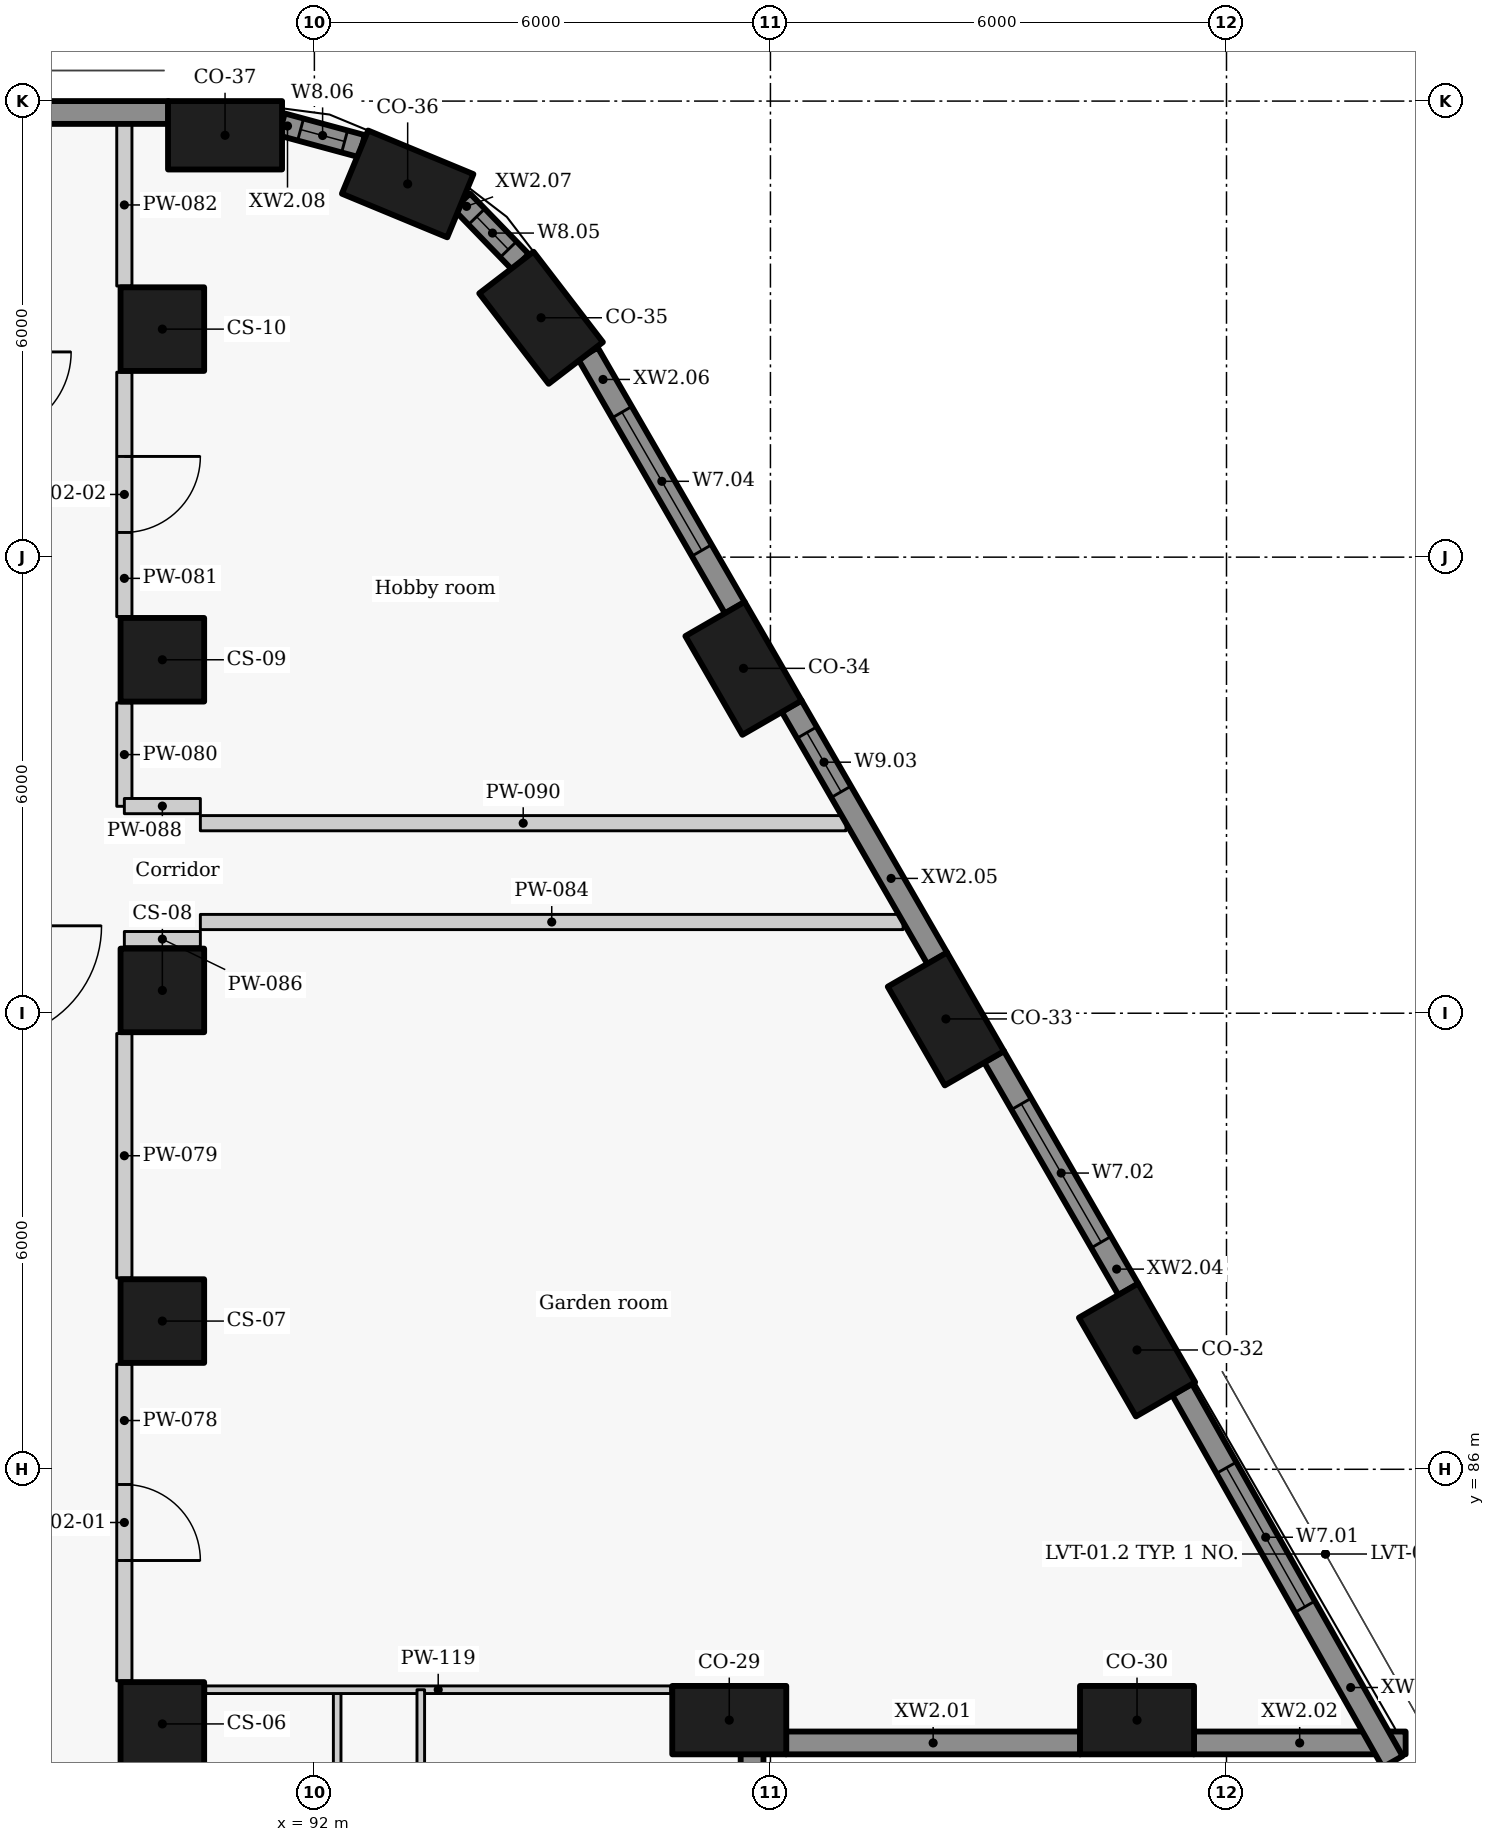
"""IFC4 building model, lengths in metres.
Left out: names, types, materials, properties, quantities, classifications, styles, units other than length and angle.
Written with IfcOpenShell. Run it as: python <this file> out.ifc"""

import sys

from ifc_helpers import new_model, si_unit, direction, frame, frame_2d, origin, origin_2d, place, context, subcontext, project, spatial, rectangle, extrude, element, fill, save


model = new_model("IFC4")
c1 = context("Model", 3, precision=1e-05, world=origin(), true_north=direction((0.0, 1.0)))
c2 = subcontext(c1, "Body", "Model", "MODEL_VIEW")
j1 = project(units=[si_unit("LENGTHUNIT", "METRE"), si_unit("PLANEANGLEUNIT", "RADIAN")], contexts=[c1])
p1 = place(None, origin())
s1 = spatial("IfcSite", under=j1, at=p1, CompositionType="ELEMENT")
p2 = place(p1, origin())
s2 = spatial("IfcBuilding", under=s1, at=p2, CompositionType="ELEMENT")
p3 = place(p2, frame((0.0, 0.0, 51.3)))
s3 = spatial("IfcBuildingStorey", under=s2, at=p3, CompositionType="ELEMENT", Elevation=51.3)
for number, where, z_axis, x_axis in (
    (1, (97.458, 82.7, 0.0), (0.0, 0.0, 1.0), (1.0, 0.0, 0.0)),
    (2, (102.823, 82.7, 0.0), (0.0, 0.0, 1.0), (1.0, 0.0, 0.0)),
    (3, (102.823, 87.57, 0.0), (0.0, 0.0, 1.0), (-0.5, 0.866, 0.0)),
    (4, (100.308, 91.925, 0.0), (0.0, 0.0, 1.0), (-0.5, 0.866, 0.0)),
    (5, (97.646, 96.537, 0.0), (0.0, 0.0, 1.0), (-0.5, 0.866, 0.0)),
    (6, (94.982, 101.149, 0.0), (0.0, 0.0, 1.0), (-0.609, 0.793, 0.0)),
    (7, (93.227, 102.91, 0.0), (0.0, 0.0, 1.0), (-0.924, 0.383, 0.0)),
    (8, (90.825, 103.55, 0.0), (0.0, 0.0, 1.0), (-1.0, 0.0, 0.0)),
):
    element("IfcColumn", number, at=place(p3, frame(where, z_axis=z_axis, x_axis=x_axis)), inside=s3, PredefinedType="COLUMN", context=c2, shape_type="SweptSolid", body=[
        extrude(rectangle(XDim=1.5, YDim=0.9, at=origin_2d()), origin(), (0.0, 0.0, 1.0), 3.3),
    ])
for number, where, z_axis, x_axis in (
    (9, (90.0, 82.65, 0.0), (0.0, 0.0, 1.0), (0.0, 1.0, 0.0)),
    (10, (90.0, 87.95, 0.0), (0.0, 0.0, 1.0), (0.0, 1.0, 0.0)),
    (11, (90.0, 92.3, 0.0), (0.0, 0.0, 1.0), (0.0, 1.0, 0.0)),
    (12, (90.0, 96.65, 0.0), (0.0, 0.0, 1.0), (0.0, 1.0, 0.0)),
    (13, (90.0, 101.0, 0.0), (0.0, 0.0, 1.0), (0.0, 1.0, 0.0)),
):
    element("IfcColumn", number, at=place(p3, frame(where, z_axis=z_axis, x_axis=x_axis)), inside=s3, PredefinedType="COLUMN", context=c2, shape_type="SweptSolid", body=[
        extrude(rectangle(XDim=1.1, YDim=1.1, at=origin_2d()), origin(), (0.0, 0.0, 1.0), 3.3),
    ])
p4 = place(p3, frame((98.204, 82.4, 0.0), z_axis=(0.0, 0.0, 1.0), x_axis=(1.0, 0.0, 0.0)))
e14 = element("IfcWall", 14, at=p4, inside=s3, PredefinedType="SOLIDWALL", context=c2, shape_type="SweptSolid", body=[
    extrude(rectangle(XDim=3.873, YDim=0.3, at=frame_2d((1.936, 0.0))), origin(), (0.0, 0.0, 1.0), 2.425),
])
p5 = place(p3, frame((103.569, 82.4, 0.0), z_axis=(0.0, 0.0, 1.0), x_axis=(1.0, 0.0, 0.0)))
e15 = element("IfcWall", 15, at=p5, inside=s3, PredefinedType="SOLIDWALL", context=c2, shape_type="SweptSolid", body=[
    extrude(rectangle(XDim=2.788, YDim=0.3, at=frame_2d((1.394, 0.0))), origin(), (0.0, 0.0, 1.0), 2.425),
])
p6 = place(p3, frame((106.186, 82.153, 0.0), z_axis=(0.0, 0.0, 1.0), x_axis=(-0.492363204642, 0.870389840655, 0.0)))
e16 = element("IfcWall", 16, at=p6, inside=s3, PredefinedType="SOLIDWALL", context=c2, shape_type="SweptSolid", body=[
    extrude(rectangle(XDim=5.626, YDim=0.3, at=frame_2d((2.813, 0.0))), origin(), (0.0, 0.0, 1.0), 2.425),
])
p7 = place(p6, frame((2.342, 0.0, 0.9)))
e17 = element("IfcOpeningElement", 17, at=p7, cuts=e16, PredefinedType="OPENING", context=c2, shape_type="SweptSolid", body=[
    extrude(rectangle(XDim=2.1, YDim=1.1, at=frame_2d((1.05, 0.55))), frame((0.0, 0.16, 0.0), z_axis=(0.0, -1.0, 0.0), x_axis=(1.0, 0.0, 0.0)), (0.0, 0.0, 1.0), 0.32),
])
p8 = place(p3, frame((102.71, 88.366, 0.0), z_axis=(0.0, 0.0, 1.0), x_axis=(-0.499977402622, 0.866038449993, 0.0)))
e18 = element("IfcWall", 18, at=p8, inside=s3, PredefinedType="SOLIDWALL", context=c2, shape_type="SweptSolid", body=[
    extrude(rectangle(XDim=3.537, YDim=0.3, at=frame_2d((1.769, 0.0))), origin(), (0.0, 0.0, 1.0), 2.425),
])
p9 = place(p8, frame((0.719, 0.0, 0.9)))
e19 = element("IfcOpeningElement", 19, at=p9, cuts=e18, PredefinedType="OPENING", context=c2, shape_type="SweptSolid", body=[
    extrude(rectangle(XDim=2.1, YDim=1.1, at=frame_2d((1.05, 0.55))), frame((0.0, 0.16, 0.0), z_axis=(0.0, -1.0, 0.0), x_axis=(1.0, 0.0, 0.0)), (0.0, 0.0, 1.0), 0.32),
])
p10 = place(p3, frame((100.195, 92.721, 0.0), z_axis=(0.0, 0.0, 1.0), x_axis=(-0.500001735503, 0.866024401789, 0.0)))
e20 = element("IfcWall", 20, at=p10, inside=s3, PredefinedType="SOLIDWALL", context=c2, shape_type="SweptSolid", body=[
    extrude(rectangle(XDim=3.834, YDim=0.3, at=frame_2d((1.917, 0.0))), origin(), (0.0, 0.0, 1.0), 2.425),
])
p11 = place(p10, frame((2.531, 0.0, 0.9)))
e21 = element("IfcOpeningElement", 21, at=p11, cuts=e20, PredefinedType="OPENING", context=c2, shape_type="SweptSolid", body=[
    extrude(rectangle(XDim=0.9, YDim=1.1, at=frame_2d((0.45, 0.55))), frame((0.0, 0.16, 0.0), z_axis=(0.0, -1.0, 0.0), x_axis=(1.0, 0.0, 0.0)), (0.0, 0.0, 1.0), 0.32),
])
p12 = place(p3, frame((97.532, 97.333, 0.0), z_axis=(0.0, 0.0, 1.0), x_axis=(-0.499948341072, 0.866055227026, 0.0)))
e22 = element("IfcWall", 22, at=p12, inside=s3, PredefinedType="SOLIDWALL", context=c2, shape_type="SweptSolid", body=[
    extrude(rectangle(XDim=3.867, YDim=0.3, at=frame_2d((1.934, 0.0))), origin(), (0.0, 0.0, 1.0), 2.425),
])
p13 = place(p12, frame((0.872, 0.0, 0.9)))
e23 = element("IfcOpeningElement", 23, at=p13, cuts=e22, PredefinedType="OPENING", context=c2, shape_type="SweptSolid", body=[
    extrude(rectangle(XDim=2.1, YDim=1.1, at=frame_2d((1.05, 0.55))), frame((0.0, 0.16, 0.0), z_axis=(0.0, -1.0, 0.0), x_axis=(1.0, 0.0, 0.0)), (0.0, 0.0, 1.0), 0.32),
])
p14 = place(p3, frame((94.713, 101.883, 0.0), z_axis=(0.0, 0.0, 1.0), x_axis=(-0.696138968055, 0.717907053285, 0.0)))
e24 = element("IfcWall", 24, at=p14, inside=s3, PredefinedType="SOLIDWALL", context=c2, shape_type="SweptSolid", body=[
    extrude(rectangle(XDim=1.11, YDim=0.3, at=frame_2d((0.555, 0.0))), origin(), (0.0, 0.0, 1.0), 2.425),
])
p15 = place(p14, frame((0.231, 0.0, 0.9)))
e25 = element("IfcOpeningElement", 25, at=p15, cuts=e24, PredefinedType="OPENING", context=c2, shape_type="SweptSolid", body=[
    extrude(rectangle(XDim=0.6, YDim=1.1, at=frame_2d((0.3, 0.55))), frame((0.0, 0.16, 0.0), z_axis=(0.0, -1.0, 0.0), x_axis=(1.0, 0.0, 0.0)), (0.0, 0.0, 1.0), 0.32),
])
p16 = place(p3, frame((92.625, 103.407, 0.0), z_axis=(0.0, 0.0, 1.0), x_axis=(-0.96522637192, 0.261415475728, 0.0)))
e26 = element("IfcWall", 26, at=p16, inside=s3, PredefinedType="SOLIDWALL", context=c2, shape_type="SweptSolid", body=[
    extrude(rectangle(XDim=1.093, YDim=0.3, at=frame_2d((0.546, 0.0))), origin(), (0.0, 0.0, 1.0), 2.425),
])
p17 = place(p16, frame((0.236, 0.0, 0.9)))
e27 = element("IfcOpeningElement", 27, at=p17, cuts=e26, PredefinedType="OPENING", context=c2, shape_type="SweptSolid", body=[
    extrude(rectangle(XDim=0.6, YDim=1.1, at=frame_2d((0.3, 0.55))), frame((0.0, 0.16, 0.0), z_axis=(0.0, -1.0, 0.0), x_axis=(1.0, 0.0, 0.0)), (0.0, 0.0, 1.0), 0.32),
])
p18 = place(p3, frame((90.079, 103.85, 0.0), z_axis=(0.0, 0.0, 1.0), x_axis=(-1.0, 0.0, 0.0)))
e28 = element("IfcWall", 28, at=p18, inside=s3, PredefinedType="SOLIDWALL", context=c2, shape_type="SweptSolid", body=[
    extrude(rectangle(XDim=20.19, YDim=0.3, at=frame_2d((10.095, 0.0))), origin(), (0.0, 0.0, 1.0), 2.425),
])
p19 = place(p3, frame((97.758, 78.046, 0.0), z_axis=(0.0, 0.0, 1.0), x_axis=(0.0, 1.0, 0.0)))
e29 = element("IfcWall", 29, at=p19, inside=s3, PredefinedType="SOLIDWALL", context=c2, shape_type="SweptSolid", body=[
    extrude(rectangle(XDim=4.208, YDim=0.3, at=frame_2d((2.104, 0.0))), origin(), (0.0, 0.0, 1.0), 2.425),
])
p20 = place(p19, frame((1.242, 0.0, 0.9)))
e30 = element("IfcOpeningElement", 30, at=p20, cuts=e29, PredefinedType="OPENING", context=c2, shape_type="SweptSolid", body=[
    extrude(rectangle(XDim=2.1, YDim=1.1, at=frame_2d((1.05, 0.55))), frame((0.0, 0.16, 0.0), z_axis=(0.0, -1.0, 0.0), x_axis=(1.0, 0.0, 0.0)), (0.0, 0.0, 1.0), 0.32),
])
p21 = place(p3, frame((89.5, 87.383, 0.0), z_axis=(0.0, 0.0, 1.0), x_axis=(0.0, -1.0, 0.0)))
e31 = element("IfcWall", 31, at=p21, inside=s3, PredefinedType="PARTITIONING", context=c2, shape_type="SweptSolid", body=[
    extrude(rectangle(XDim=4.166, YDim=0.2, at=frame_2d((2.083, 0.0))), origin(), (0.0, 0.0, 1.0), 3.025),
])
p22 = place(p21, frame((1.583, 0.0, 0.0)))
e32 = element("IfcOpeningElement", 32, at=p22, cuts=e31, PredefinedType="OPENING", context=c2, shape_type="SweptSolid", body=[
    extrude(rectangle(XDim=1.0, YDim=2.1, at=frame_2d((0.5, 1.05))), frame((0.0, 0.11, 0.0), z_axis=(0.0, -1.0, 0.0), x_axis=(1.0, 0.0, 0.0)), (0.0, 0.0, 1.0), 0.22),
])
p23 = place(p3, frame((89.5, 88.517, 0.0), z_axis=(0.0, 0.0, 1.0), x_axis=(0.0, 1.0, 0.0)))
e33 = element("IfcWall", 33, at=p23, inside=s3, PredefinedType="PARTITIONING", context=c2, shape_type="SweptSolid", body=[
    extrude(rectangle(XDim=3.216, YDim=0.2, at=frame_2d((1.608, 0.0))), origin(), (0.0, 0.0, 1.0), 3.025),
])
p24 = place(p3, frame((89.5, 94.722, 0.0), z_axis=(0.0, 0.0, 1.0), x_axis=(0.0, 1.0, 0.0)))
e34 = element("IfcWall", 34, at=p24, inside=s3, PredefinedType="PARTITIONING", context=c2, shape_type="SweptSolid", body=[
    extrude(rectangle(XDim=1.361, YDim=0.2, at=frame_2d((0.681, 0.0))), origin(), (0.0, 0.0, 1.0), 3.025),
])
p25 = place(p3, frame((89.5, 100.433, 0.0), z_axis=(0.0, 0.0, 1.0), x_axis=(0.0, -1.0, 0.0)))
e35 = element("IfcWall", 35, at=p25, inside=s3, PredefinedType="PARTITIONING", context=c2, shape_type="SweptSolid", body=[
    extrude(rectangle(XDim=3.216, YDim=0.2, at=frame_2d((1.608, 0.0))), origin(), (0.0, 0.0, 1.0), 3.025),
])
p26 = place(p25, frame((1.108, 0.0, 0.0)))
e36 = element("IfcOpeningElement", 36, at=p26, cuts=e35, PredefinedType="OPENING", context=c2, shape_type="SweptSolid", body=[
    extrude(rectangle(XDim=1.0, YDim=2.1, at=frame_2d((0.5, 1.05))), frame((0.0, 0.11, 0.0), z_axis=(0.0, -1.0, 0.0), x_axis=(1.0, 0.0, 0.0)), (0.0, 0.0, 1.0), 0.22),
])
p27 = place(p3, frame((89.5, 101.567, 0.0), z_axis=(0.0, 0.0, 1.0), x_axis=(0.0, 1.0, 0.0)))
e37 = element("IfcWall", 37, at=p27, inside=s3, PredefinedType="PARTITIONING", context=c2, shape_type="SweptSolid", body=[
    extrude(rectangle(XDim=2.133, YDim=0.2, at=frame_2d((1.066, 0.0))), origin(), (0.0, 0.0, 1.0), 3.025),
])
p28 = place(p3, frame((90.5, 93.2, 0.0), z_axis=(0.0, 0.0, 1.0), x_axis=(1.0, 0.0, 0.0)))
e38 = element("IfcWall", 38, at=p28, inside=s3, PredefinedType="PARTITIONING", context=c2, shape_type="SweptSolid", body=[
    extrude(rectangle(XDim=9.245, YDim=0.2, at=frame_2d((4.623, 0.0))), origin(), (0.0, 0.0, 1.0), 2.405),
])
for number, where, z_axis, x_axis in (
    (39, (89.5, 92.975, 0.0), (0.0, 0.0, 1.0), (1.0, 0.0, 0.0)),
    (40, (89.5, 94.725, 0.0), (0.0, 0.0, 1.0), (1.0, 0.0, 0.0)),
):
    element("IfcWall", number, at=place(p3, frame(where, z_axis=z_axis, x_axis=x_axis)), inside=s3, PredefinedType="PARTITIONING", context=c2, shape_type="SweptSolid", body=[
        extrude(rectangle(XDim=1.0, YDim=0.2, at=frame_2d((0.5, 0.0))), origin(), (0.0, 0.0, 1.0), 2.505),
    ])
p29 = place(p3, frame((90.5, 94.5, 0.0), z_axis=(0.0, 0.0, 1.0), x_axis=(1.0, 0.0, 0.0)))
e41 = element("IfcWall", 41, at=p29, inside=s3, PredefinedType="PARTITIONING", context=c2, shape_type="SweptSolid", body=[
    extrude(rectangle(XDim=8.495, YDim=0.2, at=frame_2d((4.248, 0.0))), origin(), (0.0, 0.0, 1.0), 2.405),
])
p30 = place(p3, frame((92.3, 74.1, 0.0), z_axis=(0.0, 0.0, 1.0), x_axis=(0.0, 1.0, 0.0)))
e42 = element("IfcWall", 42, at=p30, inside=s3, PredefinedType="PARTITIONING", context=c2, shape_type="SweptSolid", body=[
    extrude(rectangle(XDim=9.0, YDim=0.1, at=frame_2d((4.5, 0.0))), origin(), (0.0, 0.0, 1.0), 3.025),
])
p31 = place(p30, frame((1.62, 0.0, 0.0)))
e43 = element("IfcOpeningElement", 43, at=p31, cuts=e42, PredefinedType="OPENING", context=c2, shape_type="SweptSolid", body=[
    extrude(rectangle(XDim=0.85, YDim=2.1, at=frame_2d((0.425, 1.05))), frame((0.0, 0.06, 0.0), z_axis=(0.0, -1.0, 0.0), x_axis=(1.0, 0.0, 0.0)), (0.0, 0.0, 1.0), 0.12),
])
p32 = place(p30, frame((6.095, 0.0, 0.0)))
e44 = element("IfcOpeningElement", 44, at=p32, cuts=e42, PredefinedType="OPENING", context=c2, shape_type="SweptSolid", body=[
    extrude(rectangle(XDim=0.9, YDim=2.1, at=frame_2d((0.45, 1.05))), frame((0.0, 0.06, 0.0), z_axis=(0.0, -1.0, 0.0), x_axis=(1.0, 0.0, 0.0)), (0.0, 0.0, 1.0), 0.12),
])
p33 = place(p3, frame((90.57, 83.1, 0.0), z_axis=(0.0, 0.0, 1.0), x_axis=(1.0, 0.0, 0.0)))
e45 = element("IfcWall", 45, at=p33, inside=s3, PredefinedType="PARTITIONING", context=c2, shape_type="SweptSolid", body=[
    extrude(rectangle(XDim=6.118, YDim=0.1, at=frame_2d((3.059, 0.0))), origin(), (0.0, 0.0, 1.0), 3.025),
])
p34 = place(p3, frame((93.4, 83.1, 0.0), z_axis=(0.0, 0.0, 1.0), x_axis=(0.0, -1.0, 0.0)))
e46 = element("IfcWall", 46, at=p34, inside=s3, PredefinedType="PARTITIONING", context=c2, shape_type="SweptSolid", body=[
    extrude(rectangle(XDim=11.1, YDim=0.1, at=frame_2d((5.55, 0.0))), origin(), (0.0, 0.0, 1.0), 3.025),
])
p35 = place(p34, frame((9.039, 0.0, 0.0)))
e47 = element("IfcOpeningElement", 47, at=p35, cuts=e46, PredefinedType="OPENING", context=c2, shape_type="SweptSolid", body=[
    extrude(rectangle(XDim=0.9, YDim=2.1, at=frame_2d((0.45, 1.05))), frame((0.0, 0.06, 0.0), z_axis=(0.0, -1.0, 0.0), x_axis=(1.0, 0.0, 0.0)), (0.0, 0.0, 1.0), 0.12),
])
p36 = place(p34, frame((5.816, 0.0, 0.0)))
e48 = element("IfcOpeningElement", 48, at=p36, cuts=e46, PredefinedType="OPENING", context=c2, shape_type="SweptSolid", body=[
    extrude(rectangle(XDim=0.9, YDim=2.1, at=frame_2d((0.45, 1.05))), frame((0.0, 0.06, 0.0), z_axis=(0.0, -1.0, 0.0), x_axis=(1.0, 0.0, 0.0)), (0.0, 0.0, 1.0), 0.12),
])
p37 = place(p34, frame((1.877, 0.0, 0.0)))
e49 = element("IfcOpeningElement", 49, at=p37, cuts=e46, PredefinedType="OPENING", context=c2, shape_type="SweptSolid", body=[
    extrude(rectangle(XDim=0.9, YDim=2.1, at=frame_2d((0.45, 1.05))), frame((0.0, 0.06, 0.0), z_axis=(0.0, -1.0, 0.0), x_axis=(1.0, 0.0, 0.0)), (0.0, 0.0, 1.0), 0.12),
])
p38 = place(p7, origin())
e50 = element("IfcWindow", 50, at=p38, inside=s3, PartitioningType="SINGLE_PANEL", PredefinedType="WINDOW", context=c2, shape_type="SweptSolid", body=[
    extrude(rectangle(XDim=2.1, YDim=1.1, at=frame_2d((1.05, 0.55))), frame((0.0, 0.03, 0.0), z_axis=(0.0, -1.0, 0.0), x_axis=(1.0, 0.0, 0.0)), (0.0, 0.0, 1.0), 0.06),
])
fill(e17, e50)
p39 = place(p9, origin())
e51 = element("IfcWindow", 51, at=p39, inside=s3, PartitioningType="SINGLE_PANEL", PredefinedType="WINDOW", context=c2, shape_type="SweptSolid", body=[
    extrude(rectangle(XDim=2.1, YDim=1.1, at=frame_2d((1.05, 0.55))), frame((0.0, 0.03, 0.0), z_axis=(0.0, -1.0, 0.0), x_axis=(1.0, 0.0, 0.0)), (0.0, 0.0, 1.0), 0.06),
])
fill(e19, e51)
p40 = place(p11, origin())
e52 = element("IfcWindow", 52, at=p40, inside=s3, PartitioningType="SINGLE_PANEL", PredefinedType="WINDOW", context=c2, shape_type="SweptSolid", body=[
    extrude(rectangle(XDim=0.9, YDim=1.1, at=frame_2d((0.45, 0.55))), frame((0.0, 0.03, 0.0), z_axis=(0.0, -1.0, 0.0), x_axis=(1.0, 0.0, 0.0)), (0.0, 0.0, 1.0), 0.06),
])
fill(e21, e52)
p41 = place(p13, origin())
e53 = element("IfcWindow", 53, at=p41, inside=s3, PartitioningType="SINGLE_PANEL", PredefinedType="WINDOW", context=c2, shape_type="SweptSolid", body=[
    extrude(rectangle(XDim=2.1, YDim=1.1, at=frame_2d((1.05, 0.55))), frame((0.0, 0.03, 0.0), z_axis=(0.0, -1.0, 0.0), x_axis=(1.0, 0.0, 0.0)), (0.0, 0.0, 1.0), 0.06),
])
fill(e23, e53)
p42 = place(p15, origin())
e54 = element("IfcWindow", 54, at=p42, inside=s3, PartitioningType="SINGLE_PANEL", PredefinedType="WINDOW", context=c2, shape_type="SweptSolid", body=[
    extrude(rectangle(XDim=0.6, YDim=1.1, at=frame_2d((0.3, 0.55))), frame((0.0, 0.03, 0.0), z_axis=(0.0, -1.0, 0.0), x_axis=(1.0, 0.0, 0.0)), (0.0, 0.0, 1.0), 0.06),
])
fill(e25, e54)
p43 = place(p17, origin())
e55 = element("IfcWindow", 55, at=p43, inside=s3, PartitioningType="SINGLE_PANEL", PredefinedType="WINDOW", context=c2, shape_type="SweptSolid", body=[
    extrude(rectangle(XDim=0.6, YDim=1.1, at=frame_2d((0.3, 0.55))), frame((0.0, 0.03, 0.0), z_axis=(0.0, -1.0, 0.0), x_axis=(1.0, 0.0, 0.0)), (0.0, 0.0, 1.0), 0.06),
])
fill(e27, e55)
p44 = place(p22, origin())
e56 = element("IfcDoor", 56, at=p44, inside=s3, OperationType="SINGLE_SWING_RIGHT", PredefinedType="DOOR", context=c2, shape_type="SweptSolid", body=[
    extrude(rectangle(XDim=1.0, YDim=2.1, at=frame_2d((0.5, 1.05))), frame((0.0, 0.025, 0.0), z_axis=(0.0, -1.0, 0.0), x_axis=(1.0, 0.0, 0.0)), (0.0, 0.0, 1.0), 0.05),
])
fill(e32, e56)
p45 = place(p26, origin())
e57 = element("IfcDoor", 57, at=p45, inside=s3, OperationType="SINGLE_SWING_LEFT", PredefinedType="DOOR", context=c2, shape_type="SweptSolid", body=[
    extrude(rectangle(XDim=1.0, YDim=2.1, at=frame_2d((0.5, 1.05))), frame((0.0, 0.025, 0.0), z_axis=(0.0, -1.0, 0.0), x_axis=(1.0, 0.0, 0.0)), (0.0, 0.0, 1.0), 0.05),
])
fill(e36, e57)
save(model, sys.argv[1])
